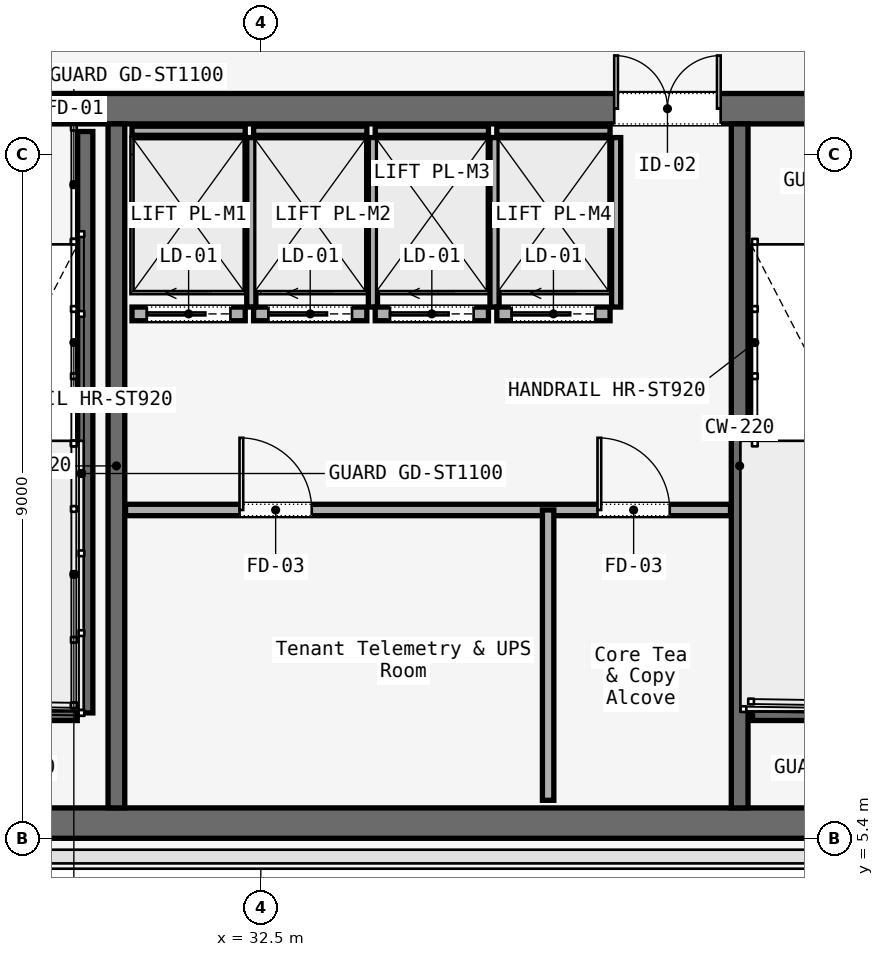
"""IFC4 building model, lengths in metres.
Left out: names, types, materials, properties, quantities, classifications, styles, units other than length and angle.
Written with IfcOpenShell. Run it as: python <this file> out.ifc"""

import sys

from ifc_helpers import new_model, si_unit, direction, frame, frame_2d, origin, place, context, subcontext, project, spatial, rectangle, extrude, element, fill, save


model = new_model("IFC4")
c1 = context("Model", 3, precision=1e-05, world=origin(), true_north=direction((0.0, 1.0)))
c2 = subcontext(c1, "Body", "Model", "MODEL_VIEW")
j1 = project(units=[si_unit("LENGTHUNIT", "METRE"), si_unit("PLANEANGLEUNIT", "RADIAN")], contexts=[c1])
p1 = place(None, origin())
s1 = spatial("IfcSite", under=j1, at=p1, CompositionType="ELEMENT")
p2 = place(p1, origin())
s2 = spatial("IfcBuilding", under=s1, at=p2, CompositionType="ELEMENT")
p3 = place(p2, frame((0.0, 0.0, 165.0)))
s3 = spatial("IfcBuildingStorey", under=s2, at=p3, CompositionType="ELEMENT", Elevation=165.0)
p4 = place(p3, frame((26.45, 15.0, 0.0), z_axis=(0.0, 0.0, 1.0), x_axis=(1.0, 0.0, 0.0)))
e1 = element("IfcWall", 1, at=p4, inside=s3, PredefinedType="SOLIDWALL", context=c2, shape_type="SweptSolid", body=[
    extrude(rectangle(XDim=31.1, YDim=0.4, at=frame_2d((15.55, 0.0))), origin(), (0.0, 0.0, 1.0), 3.58),
])
p5 = place(p4, frame((1.65, 0.0, 0.0)))
e2 = element("IfcOpeningElement", 2, at=p5, cuts=e1, PredefinedType="OPENING", context=c2, shape_type="SweptSolid", body=[
    extrude(rectangle(XDim=1.1, YDim=2.2, at=frame_2d((0.55, 1.1))), frame((0.0, 0.2, 0.0), z_axis=(0.0, -1.0, 0.0), x_axis=(1.0, 0.0, 0.0)), (0.0, 0.0, 1.0), 0.4),
])
p6 = place(p4, frame((13.65, 0.0, 0.0)))
e3 = element("IfcOpeningElement", 3, at=p6, cuts=e1, PredefinedType="OPENING", context=c2, shape_type="SweptSolid", body=[
    extrude(rectangle(XDim=1.1, YDim=2.2, at=frame_2d((0.55, 1.1))), frame((0.0, 0.2, 0.0), z_axis=(0.0, -1.0, 0.0), x_axis=(1.0, 0.0, 0.0)), (0.0, 0.0, 1.0), 0.4),
])
p7 = place(p4, frame((25.55, 0.0, 0.0)))
e4 = element("IfcOpeningElement", 4, at=p7, cuts=e1, PredefinedType="OPENING", context=c2, shape_type="SweptSolid", body=[
    extrude(rectangle(XDim=1.1, YDim=2.2, at=frame_2d((0.55, 1.1))), frame((0.0, 0.2, 0.0), z_axis=(0.0, -1.0, 0.0), x_axis=(1.0, 0.0, 0.0)), (0.0, 0.0, 1.0), 0.4),
])
p8 = place(p4, frame((10.7, 0.0, 0.0)))
e5 = element("IfcOpeningElement", 5, at=p8, cuts=e1, PredefinedType="OPENING", context=c2, shape_type="SweptSolid", body=[
    extrude(rectangle(XDim=1.4, YDim=2.2, at=frame_2d((0.7, 1.1))), frame((0.0, 0.2, 0.0), z_axis=(0.0, -1.0, 0.0), x_axis=(1.0, 0.0, 0.0)), (0.0, 0.0, 1.0), 0.4),
])
p9 = place(p4, frame((19.35, 0.0, 0.0)))
e6 = element("IfcOpeningElement", 6, at=p9, cuts=e1, PredefinedType="OPENING", context=c2, shape_type="SweptSolid", body=[
    extrude(rectangle(XDim=1.1, YDim=2.2, at=frame_2d((0.55, 1.1))), frame((0.0, 0.2, 0.0), z_axis=(0.0, -1.0, 0.0), x_axis=(1.0, 0.0, 0.0)), (0.0, 0.0, 1.0), 0.4),
])
p10 = place(p4, frame((21.4, 0.0, 0.0)))
e7 = element("IfcOpeningElement", 7, at=p10, cuts=e1, PredefinedType="OPENING", context=c2, shape_type="SweptSolid", body=[
    extrude(rectangle(XDim=0.9, YDim=2.1, at=frame_2d((0.45, 1.05))), frame((0.0, 0.2, 0.0), z_axis=(0.0, -1.0, 0.0), x_axis=(1.0, 0.0, 0.0)), (0.0, 0.0, 1.0), 0.4),
])
p11 = place(p4, frame((23.35, 0.0, 0.0)))
e8 = element("IfcOpeningElement", 8, at=p11, cuts=e1, PredefinedType="OPENING", context=c2, shape_type="SweptSolid", body=[
    extrude(rectangle(XDim=1.3, YDim=2.3, at=frame_2d((0.65, 1.15))), frame((0.0, 0.2, 0.0), z_axis=(0.0, -1.0, 0.0), x_axis=(1.0, 0.0, 0.0)), (0.0, 0.0, 1.0), 0.4),
])
p12 = place(p3, frame((26.45, 5.6, 0.0), z_axis=(0.0, 0.0, 1.0), x_axis=(1.0, 0.0, 0.0)))
e9 = element("IfcWall", 9, at=p12, inside=s3, PredefinedType="SOLIDWALL", context=c2, shape_type="SweptSolid", body=[
    extrude(rectangle(XDim=31.1, YDim=0.4, at=frame_2d((15.55, 0.0))), origin(), (0.0, 0.0, 1.0), 3.58),
])
for number, where, z_axis, x_axis in (
    (10, (30.6, 5.8, 0.0), (0.0, 0.0, 1.0), (0.0, 1.0, 0.0)),
    (11, (38.8, 5.8, 0.0), (0.0, 0.0, 1.0), (0.0, 1.0, 0.0)),
):
    element("IfcWall", number, at=place(p3, frame(where, z_axis=z_axis, x_axis=x_axis)), inside=s3, PredefinedType="SOLIDWALL", context=c2, shape_type="SweptSolid", body=[
        extrude(rectangle(XDim=9.0, YDim=0.22, at=frame_2d((4.5, 0.0))), origin(), (0.0, 0.0, 1.0), 3.58),
    ])
p13 = place(p3, frame((30.19, 14.7, 0.0), z_axis=(0.0, 0.0, 1.0), x_axis=(0.0, -1.0, 0.0)))
e12 = element("IfcWall", 12, at=p13, inside=s3, PredefinedType="SOLIDWALL", context=c2, shape_type="SweptSolid", body=[
    extrude(rectangle(XDim=7.65, YDim=0.2, at=frame_2d((3.825, 0.0))), origin(), (0.0, 0.0, 1.0), 3.8),
])
for number, where, z_axis, x_axis in (
    (13, (26.97, 7.05, 0.0), (0.0, 0.0, 1.0), (1.0, 0.0, 0.0)),
    (14, (38.97, 7.05, 0.0), (0.0, 0.0, 1.0), (1.0, 0.0, 0.0)),
):
    element("IfcWall", number, at=place(p3, frame(where, z_axis=z_axis, x_axis=x_axis)), inside=s3, PredefinedType="SOLIDWALL", context=c2, shape_type="SweptSolid", body=[
        extrude(rectangle(XDim=3.115, YDim=0.2, at=frame_2d((1.558, 0.0))), origin(), (0.0, 0.0, 1.0), 3.8),
    ])
p14 = place(p3, frame((30.72, 9.72, 0.0), z_axis=(0.0, 0.0, 1.0), x_axis=(1.0, 0.0, 0.0)))
e15 = element("IfcWall", 15, at=p14, inside=s3, PredefinedType="PARTITIONING", context=c2, shape_type="SweptSolid", body=[
    extrude(rectangle(XDim=7.96, YDim=0.15, at=frame_2d((3.98, 0.0))), origin(), (0.0, 0.0, 1.0), 3.01),
])
p15 = place(p14, frame((1.5, 0.0, 0.0)))
e16 = element("IfcOpeningElement", 16, at=p15, cuts=e15, PredefinedType="OPENING", context=c2, shape_type="SweptSolid", body=[
    extrude(rectangle(XDim=0.95, YDim=2.2, at=frame_2d((0.475, 1.1))), frame((0.0, 0.075, 0.0), z_axis=(0.0, -1.0, 0.0), x_axis=(1.0, 0.0, 0.0)), (0.0, 0.0, 1.0), 0.15),
])
p16 = place(p14, frame((6.21, 0.0, 0.0)))
e17 = element("IfcOpeningElement", 17, at=p16, cuts=e15, PredefinedType="OPENING", context=c2, shape_type="SweptSolid", body=[
    extrude(rectangle(XDim=0.95, YDim=2.2, at=frame_2d((0.475, 1.1))), frame((0.0, 0.075, 0.0), z_axis=(0.0, -1.0, 0.0), x_axis=(1.0, 0.0, 0.0)), (0.0, 0.0, 1.0), 0.15),
])
p17 = place(p3, frame((36.28, 5.9, 0.0), z_axis=(0.0, 0.0, 1.0), x_axis=(0.0, 1.0, 0.0)))
e18 = element("IfcWall", 18, at=p17, inside=s3, PredefinedType="PARTITIONING", context=c2, shape_type="SweptSolid", body=[
    extrude(rectangle(XDim=3.82, YDim=0.15, at=frame_2d((1.91, 0.0))), origin(), (0.0, 0.0, 1.0), 3.01),
])
p18 = place(p3, frame((30.805, 12.3, 0.0), z_axis=(0.0, 0.0, 1.0), x_axis=(1.0, 0.0, 0.0)))
e19 = element("IfcWall", 19, at=p18, inside=s3, PredefinedType="SOLIDWALL", context=c2, shape_type="SweptSolid", body=[
    extrude(rectangle(XDim=1.49, YDim=0.18, at=frame_2d((0.745, 0.0))), origin(), (0.0, 0.0, 1.0), 3.01),
])
p19 = place(p18, frame((0.195, 0.0, 0.0)))
e20 = element("IfcOpeningElement", 20, at=p19, cuts=e19, PredefinedType="OPENING", context=c2, shape_type="SweptSolid", body=[
    extrude(rectangle(XDim=1.1, YDim=2.2, at=frame_2d((0.55, 1.1))), frame((0.0, 0.09, 0.0), z_axis=(0.0, -1.0, 0.0), x_axis=(1.0, 0.0, 0.0)), (0.0, 0.0, 1.0), 0.18),
])
p20 = place(p3, frame((30.805, 14.71, 0.0), z_axis=(0.0, 0.0, 1.0), x_axis=(1.0, 0.0, 0.0)))
e21 = element("IfcWall", 21, at=p20, inside=s3, PredefinedType="SOLIDWALL", context=c2, shape_type="SweptSolid", body=[
    extrude(rectangle(XDim=1.49, YDim=0.12, at=frame_2d((0.745, 0.0))), origin(), (0.0, 0.0, 1.0), 3.01),
])
p21 = place(p3, frame((32.375, 12.39, 0.0), z_axis=(0.0, 0.0, 1.0), x_axis=(0.0, 1.0, 0.0)))
e22 = element("IfcWall", 22, at=p21, inside=s3, PredefinedType="SOLIDWALL", context=c2, shape_type="SweptSolid", body=[
    extrude(rectangle(XDim=2.23, YDim=0.12, at=frame_2d((1.115, 0.0))), origin(), (0.0, 0.0, 1.0), 3.01),
])
p22 = place(p3, frame((32.405, 12.3, 0.0), z_axis=(0.0, 0.0, 1.0), x_axis=(1.0, 0.0, 0.0)))
e23 = element("IfcWall", 23, at=p22, inside=s3, PredefinedType="SOLIDWALL", context=c2, shape_type="SweptSolid", body=[
    extrude(rectangle(XDim=1.49, YDim=0.18, at=frame_2d((0.745, 0.0))), origin(), (0.0, 0.0, 1.0), 3.01),
])
p23 = place(p22, frame((0.195, 0.0, 0.0)))
e24 = element("IfcOpeningElement", 24, at=p23, cuts=e23, PredefinedType="OPENING", context=c2, shape_type="SweptSolid", body=[
    extrude(rectangle(XDim=1.1, YDim=2.2, at=frame_2d((0.55, 1.1))), frame((0.0, 0.09, 0.0), z_axis=(0.0, -1.0, 0.0), x_axis=(1.0, 0.0, 0.0)), (0.0, 0.0, 1.0), 0.18),
])
p24 = place(p3, frame((32.405, 14.71, 0.0), z_axis=(0.0, 0.0, 1.0), x_axis=(1.0, 0.0, 0.0)))
e25 = element("IfcWall", 25, at=p24, inside=s3, PredefinedType="SOLIDWALL", context=c2, shape_type="SweptSolid", body=[
    extrude(rectangle(XDim=1.49, YDim=0.12, at=frame_2d((0.745, 0.0))), origin(), (0.0, 0.0, 1.0), 3.01),
])
p25 = place(p3, frame((33.975, 12.39, 0.0), z_axis=(0.0, 0.0, 1.0), x_axis=(0.0, 1.0, 0.0)))
e26 = element("IfcWall", 26, at=p25, inside=s3, PredefinedType="SOLIDWALL", context=c2, shape_type="SweptSolid", body=[
    extrude(rectangle(XDim=2.23, YDim=0.12, at=frame_2d((1.115, 0.0))), origin(), (0.0, 0.0, 1.0), 3.01),
])
p26 = place(p3, frame((34.005, 12.3, 0.0), z_axis=(0.0, 0.0, 1.0), x_axis=(1.0, 0.0, 0.0)))
e27 = element("IfcWall", 27, at=p26, inside=s3, PredefinedType="SOLIDWALL", context=c2, shape_type="SweptSolid", body=[
    extrude(rectangle(XDim=1.49, YDim=0.18, at=frame_2d((0.745, 0.0))), origin(), (0.0, 0.0, 1.0), 3.01),
])
p27 = place(p26, frame((0.195, 0.0, 0.0)))
e28 = element("IfcOpeningElement", 28, at=p27, cuts=e27, PredefinedType="OPENING", context=c2, shape_type="SweptSolid", body=[
    extrude(rectangle(XDim=1.1, YDim=2.2, at=frame_2d((0.55, 1.1))), frame((0.0, 0.09, 0.0), z_axis=(0.0, -1.0, 0.0), x_axis=(1.0, 0.0, 0.0)), (0.0, 0.0, 1.0), 0.18),
])
p28 = place(p3, frame((34.005, 14.71, 0.0), z_axis=(0.0, 0.0, 1.0), x_axis=(1.0, 0.0, 0.0)))
e29 = element("IfcWall", 29, at=p28, inside=s3, PredefinedType="SOLIDWALL", context=c2, shape_type="SweptSolid", body=[
    extrude(rectangle(XDim=1.49, YDim=0.12, at=frame_2d((0.745, 0.0))), origin(), (0.0, 0.0, 1.0), 3.01),
])
p29 = place(p3, frame((35.575, 12.39, 0.0), z_axis=(0.0, 0.0, 1.0), x_axis=(0.0, 1.0, 0.0)))
e30 = element("IfcWall", 30, at=p29, inside=s3, PredefinedType="SOLIDWALL", context=c2, shape_type="SweptSolid", body=[
    extrude(rectangle(XDim=2.23, YDim=0.12, at=frame_2d((1.115, 0.0))), origin(), (0.0, 0.0, 1.0), 3.01),
])
p30 = place(p3, frame((35.605, 12.3, 0.0), z_axis=(0.0, 0.0, 1.0), x_axis=(1.0, 0.0, 0.0)))
e31 = element("IfcWall", 31, at=p30, inside=s3, PredefinedType="SOLIDWALL", context=c2, shape_type="SweptSolid", body=[
    extrude(rectangle(XDim=1.49, YDim=0.18, at=frame_2d((0.745, 0.0))), origin(), (0.0, 0.0, 1.0), 3.01),
])
p31 = place(p30, frame((0.195, 0.0, 0.0)))
e32 = element("IfcOpeningElement", 32, at=p31, cuts=e31, PredefinedType="OPENING", context=c2, shape_type="SweptSolid", body=[
    extrude(rectangle(XDim=1.1, YDim=2.2, at=frame_2d((0.55, 1.1))), frame((0.0, 0.09, 0.0), z_axis=(0.0, -1.0, 0.0), x_axis=(1.0, 0.0, 0.0)), (0.0, 0.0, 1.0), 0.18),
])
p32 = place(p3, frame((35.605, 14.71, 0.0), z_axis=(0.0, 0.0, 1.0), x_axis=(1.0, 0.0, 0.0)))
e33 = element("IfcWall", 33, at=p32, inside=s3, PredefinedType="SOLIDWALL", context=c2, shape_type="SweptSolid", body=[
    extrude(rectangle(XDim=1.49, YDim=0.12, at=frame_2d((0.745, 0.0))), origin(), (0.0, 0.0, 1.0), 3.01),
])
p33 = place(p3, frame((37.175, 12.39, 0.0), z_axis=(0.0, 0.0, 1.0), x_axis=(0.0, 1.0, 0.0)))
e34 = element("IfcWall", 34, at=p33, inside=s3, PredefinedType="SOLIDWALL", context=c2, shape_type="SweptSolid", body=[
    extrude(rectangle(XDim=2.23, YDim=0.12, at=frame_2d((1.115, 0.0))), origin(), (0.0, 0.0, 1.0), 3.01),
])
p34 = place(p8, origin())
e35 = element("IfcDoor", 35, at=p34, inside=s3, OperationType="DOUBLE_DOOR_SINGLE_SWING", PredefinedType="DOOR", context=c2, shape_type="SweptSolid", body=[
    extrude(rectangle(XDim=1.4, YDim=2.2, at=frame_2d((0.7, 1.1))), frame((0.0, 0.025, 0.0), z_axis=(0.0, -1.0, 0.0), x_axis=(1.0, 0.0, 0.0)), (0.0, 0.0, 1.0), 0.05),
])
fill(e5, e35)
p35 = place(p15, origin())
e36 = element("IfcDoor", 36, at=p35, inside=s3, OperationType="SINGLE_SWING_LEFT", PredefinedType="DOOR", context=c2, shape_type="SweptSolid", body=[
    extrude(rectangle(XDim=0.95, YDim=2.2, at=frame_2d((0.475, 1.1))), frame((0.0, 0.025, 0.0), z_axis=(0.0, -1.0, 0.0), x_axis=(1.0, 0.0, 0.0)), (0.0, 0.0, 1.0), 0.05),
])
fill(e16, e36)
p36 = place(p16, origin())
e37 = element("IfcDoor", 37, at=p36, inside=s3, OperationType="SINGLE_SWING_RIGHT", PredefinedType="DOOR", context=c2, shape_type="SweptSolid", body=[
    extrude(rectangle(XDim=0.95, YDim=2.2, at=frame_2d((0.475, 1.1))), frame((0.0, 0.025, 0.0), z_axis=(0.0, -1.0, 0.0), x_axis=(1.0, 0.0, 0.0)), (0.0, 0.0, 1.0), 0.05),
])
fill(e17, e37)
p37 = place(p19, origin())
e38 = element("IfcDoor", 38, at=p37, inside=s3, OperationType="SLIDING_TO_LEFT", PredefinedType="DOOR", context=c2, shape_type="SweptSolid", body=[
    extrude(rectangle(XDim=1.1, YDim=2.2, at=frame_2d((0.55, 1.1))), frame((0.0, 0.025, 0.0), z_axis=(0.0, -1.0, 0.0), x_axis=(1.0, 0.0, 0.0)), (0.0, 0.0, 1.0), 0.05),
])
fill(e20, e38)
p38 = place(p23, origin())
e39 = element("IfcDoor", 39, at=p38, inside=s3, OperationType="SLIDING_TO_LEFT", PredefinedType="DOOR", context=c2, shape_type="SweptSolid", body=[
    extrude(rectangle(XDim=1.1, YDim=2.2, at=frame_2d((0.55, 1.1))), frame((0.0, 0.025, 0.0), z_axis=(0.0, -1.0, 0.0), x_axis=(1.0, 0.0, 0.0)), (0.0, 0.0, 1.0), 0.05),
])
fill(e24, e39)
p39 = place(p27, origin())
e40 = element("IfcDoor", 40, at=p39, inside=s3, OperationType="SLIDING_TO_LEFT", PredefinedType="DOOR", context=c2, shape_type="SweptSolid", body=[
    extrude(rectangle(XDim=1.1, YDim=2.2, at=frame_2d((0.55, 1.1))), frame((0.0, 0.025, 0.0), z_axis=(0.0, -1.0, 0.0), x_axis=(1.0, 0.0, 0.0)), (0.0, 0.0, 1.0), 0.05),
])
fill(e28, e40)
p40 = place(p31, origin())
e41 = element("IfcDoor", 41, at=p40, inside=s3, OperationType="SLIDING_TO_LEFT", PredefinedType="DOOR", context=c2, shape_type="SweptSolid", body=[
    extrude(rectangle(XDim=1.1, YDim=2.2, at=frame_2d((0.55, 1.1))), frame((0.0, 0.025, 0.0), z_axis=(0.0, -1.0, 0.0), x_axis=(1.0, 0.0, 0.0)), (0.0, 0.0, 1.0), 0.05),
])
fill(e32, e41)
save(model, sys.argv[1])
